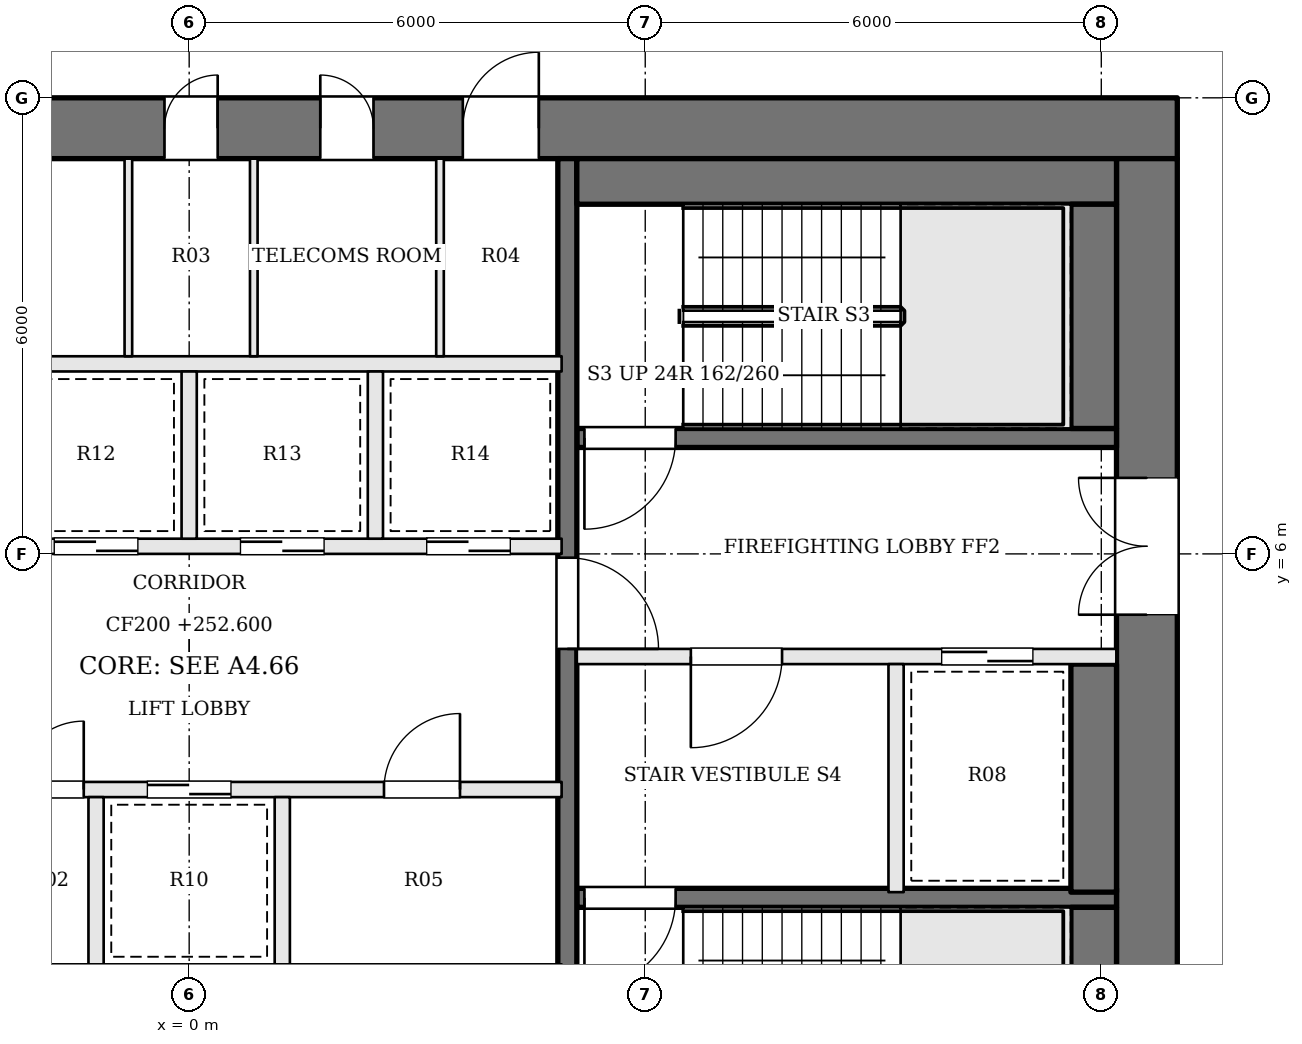
"""IFC4 building model, lengths in metres.
Left out: names, types, materials, properties, quantities, classifications, styles, units other than length and angle.
Written with IfcOpenShell. Run it as: python <this file> out.ifc"""

import sys

from ifc_helpers import new_model, si_unit, direction, frame, frame_2d, origin, place, context, subcontext, project, spatial, rectangle, extrude, element, fill, save


model = new_model("IFC4")
c1 = context("Model", 3, precision=1e-05, world=origin(), true_north=direction((0.0, 1.0)))
c2 = subcontext(c1, "Body", "Model", "MODEL_VIEW")
j1 = project(units=[si_unit("LENGTHUNIT", "METRE"), si_unit("PLANEANGLEUNIT", "RADIAN")], contexts=[c1])
p1 = place(None, origin())
s1 = spatial("IfcSite", under=j1, at=p1, CompositionType="ELEMENT")
p2 = place(p1, origin())
s2 = spatial("IfcBuilding", under=s1, at=p2, CompositionType="ELEMENT")
p3 = place(p2, frame((0.0, 0.0, 252.6)))
s3 = spatial("IfcBuildingStorey", under=s2, at=p3, CompositionType="ELEMENT", Elevation=252.6)
p4 = place(p3, frame((-13.0, 11.6, 0.0), z_axis=(0.0, 0.0, 1.0), x_axis=(1.0, 0.0, 0.0)))
e1 = element("IfcWall", 1, at=p4, inside=s3, PredefinedType="SHEAR", context=c2, shape_type="SweptSolid", body=[
    extrude(rectangle(XDim=26.0, YDim=0.8, at=frame_2d((13.0, 0.0))), origin(), (0.0, 0.0, 1.0), 3.9),
])
p5 = place(p4, frame((9.65, 0.0, 0.0)))
e2 = element("IfcOpeningElement", 2, at=p5, cuts=e1, PredefinedType="OPENING", context=c2, shape_type="SweptSolid", body=[
    extrude(rectangle(XDim=1.0, YDim=2.1, at=frame_2d((0.5, 1.05))), frame((0.0, 0.41, 0.0), z_axis=(0.0, -1.0, 0.0), x_axis=(1.0, 0.0, 0.0)), (0.0, 0.0, 1.0), 0.82),
])
p6 = place(p4, frame((12.675, 0.0, 0.0)))
e3 = element("IfcOpeningElement", 3, at=p6, cuts=e1, PredefinedType="OPENING", context=c2, shape_type="SweptSolid", body=[
    extrude(rectangle(XDim=0.7, YDim=2.1, at=frame_2d((0.35, 1.05))), frame((0.0, 0.41, 0.0), z_axis=(0.0, -1.0, 0.0), x_axis=(1.0, 0.0, 0.0)), (0.0, 0.0, 1.0), 0.82),
])
p7 = place(p4, frame((14.725, 0.0, 0.0)))
e4 = element("IfcOpeningElement", 4, at=p7, cuts=e1, PredefinedType="OPENING", context=c2, shape_type="SweptSolid", body=[
    extrude(rectangle(XDim=0.7, YDim=2.1, at=frame_2d((0.35, 1.05))), frame((0.0, 0.41, 0.0), z_axis=(0.0, -1.0, 0.0), x_axis=(1.0, 0.0, 0.0)), (0.0, 0.0, 1.0), 0.82),
])
p8 = place(p4, frame((16.6, 0.0, 0.0)))
e5 = element("IfcOpeningElement", 5, at=p8, cuts=e1, PredefinedType="OPENING", context=c2, shape_type="SweptSolid", body=[
    extrude(rectangle(XDim=1.0, YDim=2.1, at=frame_2d((0.5, 1.05))), frame((0.0, 0.41, 0.0), z_axis=(0.0, -1.0, 0.0), x_axis=(1.0, 0.0, 0.0)), (0.0, 0.0, 1.0), 0.82),
])
p9 = place(p3, frame((12.6, -2.2, 0.0), z_axis=(0.0, 0.0, 1.0), x_axis=(0.0, 1.0, 0.0)))
e6 = element("IfcWall", 6, at=p9, inside=s3, PredefinedType="SHEAR", context=c2, shape_type="SweptSolid", body=[
    extrude(rectangle(XDim=13.4, YDim=0.8, at=frame_2d((6.7, 0.0))), origin(), (0.0, 0.0, 1.0), 3.9),
])
p10 = place(p9, frame((7.4, 0.0, 0.0)))
e7 = element("IfcOpeningElement", 7, at=p10, cuts=e6, PredefinedType="OPENING", context=c2, shape_type="SweptSolid", body=[
    extrude(rectangle(XDim=1.8, YDim=2.1, at=frame_2d((0.9, 1.05))), frame((0.0, 0.41, 0.0), z_axis=(0.0, -1.0, 0.0), x_axis=(1.0, 0.0, 0.0)), (0.0, 0.0, 1.0), 0.82),
])
p11 = place(p3, frame((12.2, 7.525, 0.0), z_axis=(0.0, 0.0, 1.0), x_axis=(-1.0, 0.0, 0.0)))
e8 = element("IfcWall", 8, at=p11, inside=s3, PredefinedType="SOLIDWALL", context=c2, shape_type="SweptSolid", body=[
    extrude(rectangle(XDim=7.1, YDim=0.25, at=frame_2d((3.55, 0.0))), origin(), (0.0, 0.0, 1.0), 3.7),
])
p12 = place(p11, frame((5.8, 0.0, 0.0)))
e9 = element("IfcOpeningElement", 9, at=p12, cuts=e8, PredefinedType="OPENING", context=c2, shape_type="SweptSolid", body=[
    extrude(rectangle(XDim=1.2, YDim=2.1, at=frame_2d((0.6, 1.05))), frame((0.0, 0.135, 0.0), z_axis=(0.0, -1.0, 0.0), x_axis=(1.0, 0.0, 0.0)), (0.0, 0.0, 1.0), 0.27),
])
p13 = place(p3, frame((12.2, 4.65, 0.0), z_axis=(0.0, 0.0, 1.0), x_axis=(-1.0, 0.0, 0.0)))
e10 = element("IfcWall", 10, at=p13, inside=s3, PredefinedType="SOLIDWALL", context=c2, shape_type="SweptSolid", body=[
    extrude(rectangle(XDim=7.1, YDim=0.2, at=frame_2d((3.55, 0.0))), origin(), (0.0, 0.0, 1.0), 3.7),
])
p14 = place(p13, frame((4.4, 0.0, 0.0)))
e11 = element("IfcOpeningElement", 11, at=p14, cuts=e10, PredefinedType="OPENING", context=c2, shape_type="SweptSolid", body=[
    extrude(rectangle(XDim=1.2, YDim=2.1, at=frame_2d((0.6, 1.05))), frame((0.0, 0.11, 0.0), z_axis=(0.0, -1.0, 0.0), x_axis=(1.0, 0.0, 0.0)), (0.0, 0.0, 1.0), 0.22),
])
p15 = place(p13, frame((1.1, 0.0, 0.0)))
e12 = element("IfcOpeningElement", 12, at=p15, cuts=e10, PredefinedType="OPENING", context=c2, shape_type="SweptSolid", body=[
    extrude(rectangle(XDim=1.2, YDim=2.1, at=frame_2d((0.6, 1.05))), frame((0.0, 0.11, 0.0), z_axis=(0.0, -1.0, 0.0), x_axis=(1.0, 0.0, 0.0)), (0.0, 0.0, 1.0), 0.22),
])
p16 = place(p3, frame((12.2, 1.475, 0.0), z_axis=(0.0, 0.0, 1.0), x_axis=(-1.0, 0.0, 0.0)))
e13 = element("IfcWall", 13, at=p16, inside=s3, PredefinedType="SOLIDWALL", context=c2, shape_type="SweptSolid", body=[
    extrude(rectangle(XDim=7.1, YDim=0.25, at=frame_2d((3.55, 0.0))), origin(), (0.0, 0.0, 1.0), 3.7),
])
p17 = place(p16, frame((5.8, 0.0, 0.0)))
e14 = element("IfcOpeningElement", 14, at=p17, cuts=e13, PredefinedType="OPENING", context=c2, shape_type="SweptSolid", body=[
    extrude(rectangle(XDim=1.2, YDim=2.1, at=frame_2d((0.6, 1.05))), frame((0.0, 0.135, 0.0), z_axis=(0.0, -1.0, 0.0), x_axis=(1.0, 0.0, 0.0)), (0.0, 0.0, 1.0), 0.27),
])
p18 = place(p3, frame((9.3, 4.55, 0.0), z_axis=(0.0, 0.0, 1.0), x_axis=(0.0, -1.0, 0.0)))
e15 = element("IfcWall", 15, at=p18, inside=s3, PredefinedType="SOLIDWALL", context=c2, shape_type="SweptSolid", body=[
    extrude(rectangle(XDim=3.0, YDim=0.2, at=frame_2d((1.5, 0.0))), origin(), (0.0, 0.0, 1.0), 3.7),
])
p19 = place(p3, frame((4.975, 11.2, 0.0), z_axis=(0.0, 0.0, 1.0), x_axis=(0.0, -1.0, 0.0)))
e16 = element("IfcWall", 16, at=p19, inside=s3, PredefinedType="SOLIDWALL", context=c2, shape_type="SweptSolid", body=[
    extrude(rectangle(XDim=13.4, YDim=0.25, at=frame_2d((6.7, 0.0))), origin(), (0.0, 0.0, 1.0), 3.7),
])
p20 = place(p19, frame((5.25, 0.0, 0.0)))
e17 = element("IfcOpeningElement", 17, at=p20, cuts=e16, PredefinedType="OPENING", context=c2, shape_type="SweptSolid", body=[
    extrude(rectangle(XDim=1.2, YDim=2.1, at=frame_2d((0.6, 1.05))), frame((0.0, 0.135, 0.0), z_axis=(0.0, -1.0, 0.0), x_axis=(1.0, 0.0, 0.0)), (0.0, 0.0, 1.0), 0.27),
])
p21 = place(p3, frame((12.2, 10.9, 0.0), z_axis=(0.0, 0.0, 1.0), x_axis=(-1.0, 0.0, 0.0)))
e18 = element("IfcWall", 18, at=p21, inside=s3, PredefinedType="SOLIDWALL", context=c2, shape_type="SweptSolid", body=[
    extrude(rectangle(XDim=7.1, YDim=0.6, at=frame_2d((3.55, 0.0))), origin(), (0.0, 0.0, 1.0), 3.7),
])
p22 = place(p3, frame((11.9, 10.6, 0.0), z_axis=(0.0, 0.0, 1.0), x_axis=(0.0, -1.0, 0.0)))
e19 = element("IfcWall", 19, at=p22, inside=s3, PredefinedType="SOLIDWALL", context=c2, shape_type="SweptSolid", body=[
    extrude(rectangle(XDim=2.95, YDim=0.6, at=frame_2d((1.475, 0.0))), origin(), (0.0, 0.0, 1.0), 3.7),
])
p23 = place(p3, frame((11.9, 4.55, 0.0), z_axis=(0.0, 0.0, 1.0), x_axis=(0.0, -1.0, 0.0)))
e20 = element("IfcWall", 20, at=p23, inside=s3, PredefinedType="SOLIDWALL", context=c2, shape_type="SweptSolid", body=[
    extrude(rectangle(XDim=3.0, YDim=0.6, at=frame_2d((1.5, 0.0))), origin(), (0.0, 0.0, 1.0), 3.7),
])
p24 = place(p3, frame((11.9, 1.35, 0.0), z_axis=(0.0, 0.0, 1.0), x_axis=(0.0, -1.0, 0.0)))
e21 = element("IfcWall", 21, at=p24, inside=s3, PredefinedType="SOLIDWALL", context=c2, shape_type="SweptSolid", body=[
    extrude(rectangle(XDim=2.95, YDim=0.6, at=frame_2d((1.475, 0.0))), origin(), (0.0, 0.0, 1.0), 3.7),
])
p25 = place(p3, frame((-4.9, 2.9, 0.0), z_axis=(0.0, 0.0, 1.0), x_axis=(1.0, 0.0, 0.0)))
e22 = element("IfcWall", 22, at=p25, inside=s3, PredefinedType="SOLIDWALL", context=c2, shape_type="SweptSolid", body=[
    extrude(rectangle(XDim=9.8, YDim=0.2, at=frame_2d((4.9, 0.0))), origin(), (0.0, 0.0, 1.0), 3.7),
])
p26 = place(p25, frame((0.675, 0.0, 0.0)))
e23 = element("IfcOpeningElement", 23, at=p26, cuts=e22, PredefinedType="OPENING", context=c2, shape_type="SweptSolid", body=[
    extrude(rectangle(XDim=1.1, YDim=2.1, at=frame_2d((0.55, 1.05))), frame((0.0, 0.11, 0.0), z_axis=(0.0, -1.0, 0.0), x_axis=(1.0, 0.0, 0.0)), (0.0, 0.0, 1.0), 0.22),
])
p27 = place(p25, frame((2.613, 0.0, 0.0)))
e24 = element("IfcOpeningElement", 24, at=p27, cuts=e22, PredefinedType="OPENING", context=c2, shape_type="SweptSolid", body=[
    extrude(rectangle(XDim=0.9, YDim=2.1, at=frame_2d((0.45, 1.05))), frame((0.0, 0.11, 0.0), z_axis=(0.0, -1.0, 0.0), x_axis=(1.0, 0.0, 0.0)), (0.0, 0.0, 1.0), 0.22),
])
p28 = place(p25, frame((4.35, 0.0, 0.0)))
e25 = element("IfcOpeningElement", 25, at=p28, cuts=e22, PredefinedType="OPENING", context=c2, shape_type="SweptSolid", body=[
    extrude(rectangle(XDim=1.1, YDim=2.1, at=frame_2d((0.55, 1.05))), frame((0.0, 0.11, 0.0), z_axis=(0.0, -1.0, 0.0), x_axis=(1.0, 0.0, 0.0)), (0.0, 0.0, 1.0), 0.22),
])
p29 = place(p25, frame((7.463, 0.0, 0.0)))
e26 = element("IfcOpeningElement", 26, at=p29, cuts=e22, PredefinedType="OPENING", context=c2, shape_type="SweptSolid", body=[
    extrude(rectangle(XDim=1.0, YDim=2.1, at=frame_2d((0.5, 1.05))), frame((0.0, 0.11, 0.0), z_axis=(0.0, -1.0, 0.0), x_axis=(1.0, 0.0, 0.0)), (0.0, 0.0, 1.0), 0.22),
])
p30 = place(p3, frame((-4.9, 6.1, 0.0), z_axis=(0.0, 0.0, 1.0), x_axis=(1.0, 0.0, 0.0)))
e27 = element("IfcWall", 27, at=p30, inside=s3, PredefinedType="SOLIDWALL", context=c2, shape_type="SweptSolid", body=[
    extrude(rectangle(XDim=9.8, YDim=0.2, at=frame_2d((4.9, 0.0))), origin(), (0.0, 0.0, 1.0), 3.7),
])
p31 = place(p30, frame((0.675, 0.0, 0.0)))
e28 = element("IfcOpeningElement", 28, at=p31, cuts=e27, PredefinedType="OPENING", context=c2, shape_type="SweptSolid", body=[
    extrude(rectangle(XDim=1.1, YDim=2.1, at=frame_2d((0.55, 1.05))), frame((0.0, 0.11, 0.0), z_axis=(0.0, -1.0, 0.0), x_axis=(1.0, 0.0, 0.0)), (0.0, 0.0, 1.0), 0.22),
])
p32 = place(p30, frame((3.125, 0.0, 0.0)))
e29 = element("IfcOpeningElement", 29, at=p32, cuts=e27, PredefinedType="OPENING", context=c2, shape_type="SweptSolid", body=[
    extrude(rectangle(XDim=1.1, YDim=2.1, at=frame_2d((0.55, 1.05))), frame((0.0, 0.11, 0.0), z_axis=(0.0, -1.0, 0.0), x_axis=(1.0, 0.0, 0.0)), (0.0, 0.0, 1.0), 0.22),
])
p33 = place(p30, frame((5.575, 0.0, 0.0)))
e30 = element("IfcOpeningElement", 30, at=p33, cuts=e27, PredefinedType="OPENING", context=c2, shape_type="SweptSolid", body=[
    extrude(rectangle(XDim=1.1, YDim=2.1, at=frame_2d((0.55, 1.05))), frame((0.0, 0.11, 0.0), z_axis=(0.0, -1.0, 0.0), x_axis=(1.0, 0.0, 0.0)), (0.0, 0.0, 1.0), 0.22),
])
p34 = place(p30, frame((8.025, 0.0, 0.0)))
e31 = element("IfcOpeningElement", 31, at=p34, cuts=e27, PredefinedType="OPENING", context=c2, shape_type="SweptSolid", body=[
    extrude(rectangle(XDim=1.1, YDim=2.1, at=frame_2d((0.55, 1.05))), frame((0.0, 0.11, 0.0), z_axis=(0.0, -1.0, 0.0), x_axis=(1.0, 0.0, 0.0)), (0.0, 0.0, 1.0), 0.22),
])
p35 = place(p3, frame((-4.9, 8.5, 0.0), z_axis=(0.0, 0.0, 1.0), x_axis=(1.0, 0.0, 0.0)))
e32 = element("IfcWall", 32, at=p35, inside=s3, PredefinedType="SOLIDWALL", context=c2, shape_type="SweptSolid", body=[
    extrude(rectangle(XDim=9.8, YDim=0.2, at=frame_2d((4.9, 0.0))), origin(), (0.0, 0.0, 1.0), 3.7),
])
for number, where, z_axis, x_axis in (
    (33, (-1.225, 0.6, 0.0), (0.0, 0.0, 1.0), (0.0, 1.0, 0.0)),
    (34, (1.225, 0.6, 0.0), (0.0, 0.0, 1.0), (0.0, 1.0, 0.0)),
    (35, (0.0, 6.2, 0.0), (0.0, 0.0, 1.0), (0.0, 1.0, 0.0)),
    (36, (2.45, 6.2, 0.0), (0.0, 0.0, 1.0), (0.0, 1.0, 0.0)),
):
    element("IfcWall", number, at=place(p3, frame(where, z_axis=z_axis, x_axis=x_axis)), inside=s3, PredefinedType="SOLIDWALL", context=c2, shape_type="SweptSolid", body=[
        extrude(rectangle(XDim=2.2, YDim=0.2, at=frame_2d((1.1, 0.0))), origin(), (0.0, 0.0, 1.0), 3.7),
    ])
for number, where, z_axis, x_axis in (
    (37, (-0.8, 8.6, 0.0), (0.0, 0.0, 1.0), (0.0, 1.0, 0.0)),
    (38, (0.85, 8.6, 0.0), (0.0, 0.0, 1.0), (0.0, 1.0, 0.0)),
    (39, (3.3, 8.6, 0.0), (0.0, 0.0, 1.0), (0.0, 1.0, 0.0)),
):
    element("IfcWall", number, at=place(p3, frame(where, z_axis=z_axis, x_axis=x_axis)), inside=s3, PredefinedType="PARTITIONING", context=c2, shape_type="SweptSolid", body=[
        extrude(rectangle(XDim=2.6, YDim=0.1, at=frame_2d((1.3, 0.0))), origin(), (0.0, 0.0, 1.0), 3.7),
    ])
p36 = place(p10, origin())
e40 = element("IfcDoor", 40, at=p36, inside=s3, OperationType="DOUBLE_DOOR_SINGLE_SWING", PredefinedType="DOOR", context=c2, shape_type="SweptSolid", body=[
    extrude(rectangle(XDim=1.8, YDim=2.1, at=frame_2d((0.9, 1.05))), frame((0.0, 0.025, 0.0), z_axis=(0.0, -1.0, 0.0), x_axis=(1.0, 0.0, 0.0)), (0.0, 0.0, 1.0), 0.05),
])
fill(e7, e40)
p37 = place(p20, origin())
e41 = element("IfcDoor", 41, at=p37, inside=s3, OperationType="SINGLE_SWING_RIGHT", PredefinedType="DOOR", context=c2, shape_type="SweptSolid", body=[
    extrude(rectangle(XDim=1.2, YDim=2.1, at=frame_2d((0.6, 1.05))), frame((0.0, 0.025, 0.0), z_axis=(0.0, -1.0, 0.0), x_axis=(1.0, 0.0, 0.0)), (0.0, 0.0, 1.0), 0.05),
])
fill(e17, e41)
p38 = place(p14, origin())
e42 = element("IfcDoor", 42, at=p38, inside=s3, OperationType="SINGLE_SWING_RIGHT", PredefinedType="DOOR", context=c2, shape_type="SweptSolid", body=[
    extrude(rectangle(XDim=1.2, YDim=2.1, at=frame_2d((0.6, 1.05))), frame((0.0, 0.025, 0.0), z_axis=(0.0, -1.0, 0.0), x_axis=(1.0, 0.0, 0.0)), (0.0, 0.0, 1.0), 0.05),
])
fill(e11, e42)
p39 = place(p12, origin())
e43 = element("IfcDoor", 43, at=p39, inside=s3, OperationType="SINGLE_SWING_RIGHT", PredefinedType="DOOR", context=c2, shape_type="SweptSolid", body=[
    extrude(rectangle(XDim=1.2, YDim=2.1, at=frame_2d((0.6, 1.05))), frame((0.0, 0.025, 0.0), z_axis=(0.0, -1.0, 0.0), x_axis=(1.0, 0.0, 0.0)), (0.0, 0.0, 1.0), 0.05),
])
fill(e9, e43)
p40 = place(p17, origin())
e44 = element("IfcDoor", 44, at=p40, inside=s3, OperationType="SINGLE_SWING_RIGHT", PredefinedType="DOOR", context=c2, shape_type="SweptSolid", body=[
    extrude(rectangle(XDim=1.2, YDim=2.1, at=frame_2d((0.6, 1.05))), frame((0.0, 0.025, 0.0), z_axis=(0.0, -1.0, 0.0), x_axis=(1.0, 0.0, 0.0)), (0.0, 0.0, 1.0), 0.05),
])
fill(e14, e44)
p41 = place(p15, origin())
e45 = element("IfcDoor", 45, at=p41, inside=s3, OperationType="SLIDING_TO_RIGHT", PredefinedType="DOOR", context=c2, shape_type="SweptSolid", body=[
    extrude(rectangle(XDim=1.2, YDim=2.1, at=frame_2d((0.6, 1.05))), frame((0.0, 0.025, 0.0), z_axis=(0.0, -1.0, 0.0), x_axis=(1.0, 0.0, 0.0)), (0.0, 0.0, 1.0), 0.05),
])
fill(e12, e45)
p42 = place(p27, origin())
e46 = element("IfcDoor", 46, at=p42, inside=s3, OperationType="SINGLE_SWING_RIGHT", PredefinedType="DOOR", context=c2, shape_type="SweptSolid", body=[
    extrude(rectangle(XDim=0.9, YDim=2.1, at=frame_2d((0.45, 1.05))), frame((0.0, 0.025, 0.0), z_axis=(0.0, -1.0, 0.0), x_axis=(1.0, 0.0, 0.0)), (0.0, 0.0, 1.0), 0.05),
])
fill(e24, e46)
p43 = place(p28, origin())
e47 = element("IfcDoor", 47, at=p43, inside=s3, OperationType="SLIDING_TO_LEFT", PredefinedType="DOOR", context=c2, shape_type="SweptSolid", body=[
    extrude(rectangle(XDim=1.1, YDim=2.1, at=frame_2d((0.55, 1.05))), frame((0.0, 0.025, 0.0), z_axis=(0.0, -1.0, 0.0), x_axis=(1.0, 0.0, 0.0)), (0.0, 0.0, 1.0), 0.05),
])
fill(e25, e47)
p44 = place(p29, origin())
e48 = element("IfcDoor", 48, at=p44, inside=s3, OperationType="SINGLE_SWING_RIGHT", PredefinedType="DOOR", context=c2, shape_type="SweptSolid", body=[
    extrude(rectangle(XDim=1.0, YDim=2.1, at=frame_2d((0.5, 1.05))), frame((0.0, 0.025, 0.0), z_axis=(0.0, -1.0, 0.0), x_axis=(1.0, 0.0, 0.0)), (0.0, 0.0, 1.0), 0.05),
])
fill(e26, e48)
p45 = place(p32, origin())
e49 = element("IfcDoor", 49, at=p45, inside=s3, OperationType="SLIDING_TO_LEFT", PredefinedType="DOOR", context=c2, shape_type="SweptSolid", body=[
    extrude(rectangle(XDim=1.1, YDim=2.1, at=frame_2d((0.55, 1.05))), frame((0.0, 0.025, 0.0), z_axis=(0.0, -1.0, 0.0), x_axis=(1.0, 0.0, 0.0)), (0.0, 0.0, 1.0), 0.05),
])
fill(e29, e49)
p46 = place(p33, origin())
e50 = element("IfcDoor", 50, at=p46, inside=s3, OperationType="SLIDING_TO_RIGHT", PredefinedType="DOOR", context=c2, shape_type="SweptSolid", body=[
    extrude(rectangle(XDim=1.1, YDim=2.1, at=frame_2d((0.55, 1.05))), frame((0.0, 0.025, 0.0), z_axis=(0.0, -1.0, 0.0), x_axis=(1.0, 0.0, 0.0)), (0.0, 0.0, 1.0), 0.05),
])
fill(e30, e50)
p47 = place(p34, origin())
e51 = element("IfcDoor", 51, at=p47, inside=s3, OperationType="SLIDING_TO_LEFT", PredefinedType="DOOR", context=c2, shape_type="SweptSolid", body=[
    extrude(rectangle(XDim=1.1, YDim=2.1, at=frame_2d((0.55, 1.05))), frame((0.0, 0.025, 0.0), z_axis=(0.0, -1.0, 0.0), x_axis=(1.0, 0.0, 0.0)), (0.0, 0.0, 1.0), 0.05),
])
fill(e31, e51)
p48 = place(p6, origin())
e52 = element("IfcDoor", 52, at=p48, inside=s3, OperationType="SINGLE_SWING_RIGHT", PredefinedType="DOOR", context=c2, shape_type="SweptSolid", body=[
    extrude(rectangle(XDim=0.7, YDim=2.1, at=frame_2d((0.35, 1.05))), frame((0.0, 0.025, 0.0), z_axis=(0.0, -1.0, 0.0), x_axis=(1.0, 0.0, 0.0)), (0.0, 0.0, 1.0), 0.05),
])
fill(e3, e52)
p49 = place(p7, origin())
e53 = element("IfcDoor", 53, at=p49, inside=s3, OperationType="SINGLE_SWING_LEFT", PredefinedType="DOOR", context=c2, shape_type="SweptSolid", body=[
    extrude(rectangle(XDim=0.7, YDim=2.1, at=frame_2d((0.35, 1.05))), frame((0.0, 0.025, 0.0), z_axis=(0.0, -1.0, 0.0), x_axis=(1.0, 0.0, 0.0)), (0.0, 0.0, 1.0), 0.05),
])
fill(e4, e53)
p50 = place(p8, origin())
e54 = element("IfcDoor", 54, at=p50, inside=s3, OperationType="SINGLE_SWING_RIGHT", PredefinedType="DOOR", context=c2, shape_type="SweptSolid", body=[
    extrude(rectangle(XDim=1.0, YDim=2.1, at=frame_2d((0.5, 1.05))), frame((0.0, 0.025, 0.0), z_axis=(0.0, -1.0, 0.0), x_axis=(1.0, 0.0, 0.0)), (0.0, 0.0, 1.0), 0.05),
])
fill(e5, e54)
save(model, sys.argv[1])
